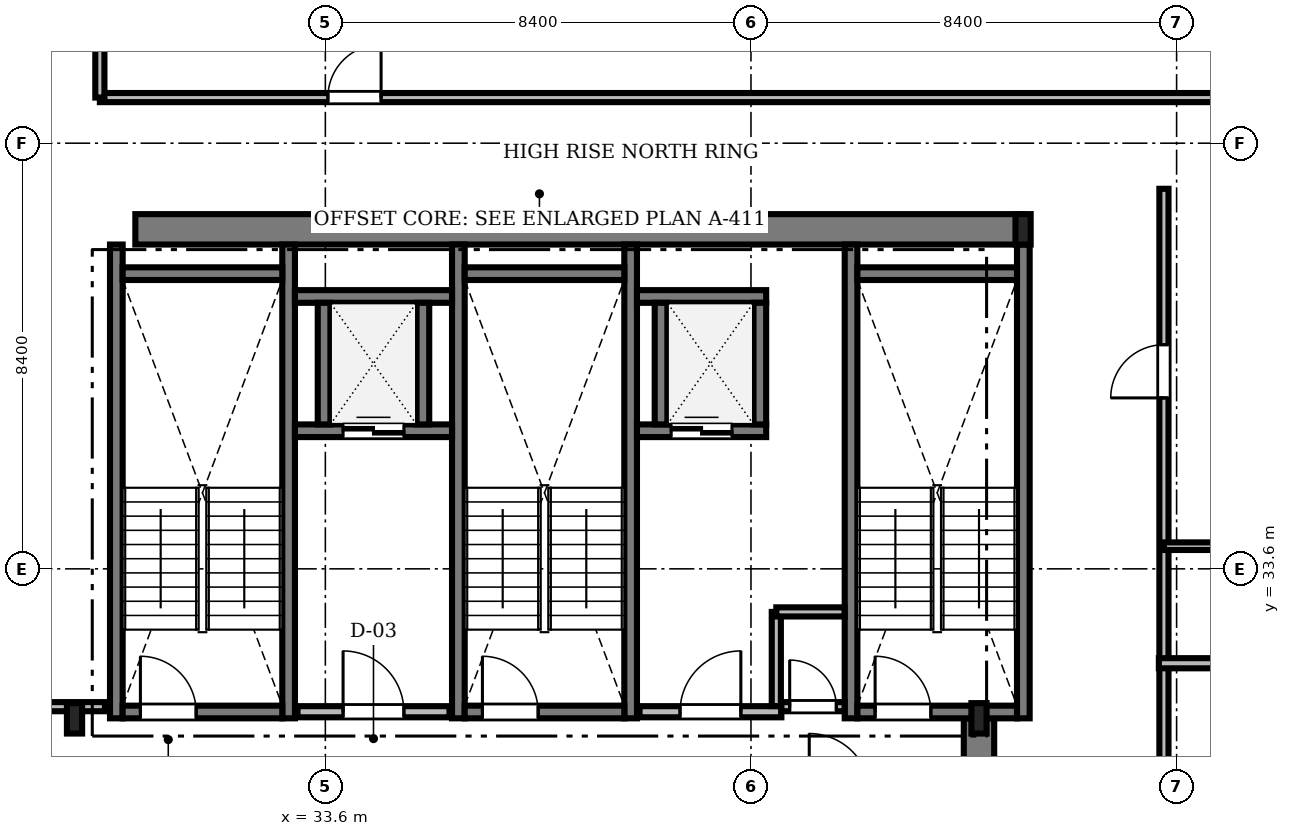
"""IFC4 building model, lengths in metres.
Left out: names, types, materials, properties, quantities, classifications, styles, units other than length and angle.
Written with IfcOpenShell. Run it as: python <this file> out.ifc"""

import sys

from ifc_helpers import new_model, si_unit, direction, frame, frame_2d, origin, origin_2d, place, context, subcontext, project, spatial, rectangle, i_section, extrude, source, transform, mapped, element, fill, save


model = new_model("IFC4")
c1 = context("Model", 3, precision=1e-05, world=origin(), true_north=direction((0.0, 1.0)))
c2 = subcontext(c1, "Body", "Model", "MODEL_VIEW")
j1 = project(units=[si_unit("LENGTHUNIT", "METRE"), si_unit("PLANEANGLEUNIT", "RADIAN")], contexts=[c1])
p1 = place(None, origin())
s1 = spatial("IfcSite", under=j1, at=p1, CompositionType="ELEMENT")
p2 = place(p1, origin())
s2 = spatial("IfcBuilding", under=s1, at=p2, CompositionType="ELEMENT")
p3 = place(p2, frame((0.0, 0.0, 242.7)))
s3 = spatial("IfcBuildingStorey", under=s2, at=p3, CompositionType="ELEMENT", Elevation=242.7)
m1 = source(origin(), c2, "Body", "SweptSolid", [
    extrude(rectangle(XDim=17.52, YDim=0.6, at=frame_2d((8.76, 0.0))), origin(), (0.0, 0.0, 1.0), 3.73),
])
p4 = place(p3, frame((29.85, 40.3, 0.0), z_axis=(0.0, 0.0, 1.0), x_axis=(1.0, 0.0, 0.0)))
e1 = element("IfcWall", 1, at=p4, inside=s3, PredefinedType="SHEAR", context=c2, shape_type="MappedRepresentation", body=[
    mapped(m1, transform((0.0, 0.0, 0.0), scale=1.0)),
])
m2 = source(origin(), c2, "Body", "SweptSolid", [
    extrude(rectangle(XDim=13.15, YDim=0.6, at=frame_2d((6.575, 0.0))), origin(), (0.0, 0.0, 1.0), 3.73),
])
p5 = place(p3, frame((46.5, 17.5, 0.0), z_axis=(0.0, 0.0, 1.0), x_axis=(0.0, 1.0, 0.0)))
e2 = element("IfcWall", 2, at=p5, inside=s3, PredefinedType="SHEAR", context=c2, shape_type="MappedRepresentation", body=[
    mapped(m2, transform((0.0, 0.0, 0.0), scale=1.0)),
])
m3 = source(origin(), c2, "Body", "SweptSolid", [
    extrude(i_section(OverallWidth=0.3, OverallDepth=0.6, WebThickness=0.015, FlangeThickness=0.03, FilletRadius=0.027, at=origin_2d()), origin(), (0.0, 0.0, 1.0), 3.73),
])
for number, where, z_axis, x_axis in (
    (3, (28.65, 30.65, 0.0), (0.0, 0.0, 1.0), (1.0, 0.0, 0.0)),
    (4, (46.5, 30.65, 0.0), (0.0, 0.0, 1.0), (1.0, 0.0, 0.0)),
    (5, (47.37, 40.3, 0.0), (0.0, 0.0, 1.0), (1.0, 0.0, 0.0)),
):
    element("IfcColumn", number, at=place(p3, frame(where, z_axis=z_axis, x_axis=x_axis)), inside=s3, PredefinedType="COLUMN", context=c2, shape_type="MappedRepresentation", body=[
        mapped(m3, transform((0.0, 0.0, 0.0), scale=1.0)),
    ])
m4 = source(origin(), c2, "Body", "SweptSolid", [
    extrude(rectangle(XDim=9.35, YDim=0.25, at=frame_2d((4.675, 0.0))), origin(), (0.0, 0.0, 1.0), 3.75),
])
for number, where, z_axis, x_axis in (
    (6, (29.475, 30.65, 0.0), (0.0, 0.0, 1.0), (0.0, 1.0, 0.0)),
    (7, (32.875, 30.65, 0.0), (0.0, 0.0, 1.0), (0.0, 1.0, 0.0)),
):
    element("IfcWall", number, at=place(p3, frame(where, z_axis=z_axis, x_axis=x_axis)), inside=s3, PredefinedType="SOLIDWALL", context=c2, shape_type="MappedRepresentation", body=[
        mapped(m4, transform((0.0, 0.0, 0.0), scale=1.0)),
    ])
m5 = source(origin(), c2, "Body", "SweptSolid", [
    extrude(rectangle(XDim=3.15, YDim=0.25, at=frame_2d((1.575, 0.0))), origin(), (0.0, 0.0, 1.0), 3.75),
])
p6 = place(p3, frame((29.6, 39.425, 0.0), z_axis=(0.0, 0.0, 1.0), x_axis=(1.0, 0.0, 0.0)))
e8 = element("IfcWall", 8, at=p6, inside=s3, PredefinedType="SOLIDWALL", context=c2, shape_type="MappedRepresentation", body=[
    mapped(m5, transform((0.0, 0.0, 0.0), scale=1.0)),
])
p7 = place(p3, frame((29.6, 30.775, 0.0), z_axis=(0.0, 0.0, 1.0), x_axis=(1.0, 0.0, 0.0)))
e9 = element("IfcWall", 9, at=p7, inside=s3, PredefinedType="SOLIDWALL", context=c2, shape_type="MappedRepresentation", body=[
    mapped(m5, transform((0.0, 0.0, 0.0), scale=1.0)),
])
m6 = source(origin(), c2, "Body", "SweptSolid", [
    extrude(rectangle(XDim=1.1, YDim=2.2, at=frame_2d((0.55, 1.1))), frame((0.0, 0.135, 0.0), z_axis=(0.0, -1.0, 0.0), x_axis=(1.0, 0.0, 0.0)), (0.0, 0.0, 1.0), 0.27),
])
p8 = place(p7, frame((0.35, 0.0, 0.0)))
e10 = element("IfcOpeningElement", 10, at=p8, cuts=e9, PredefinedType="OPENING", context=c2, shape_type="MappedRepresentation", body=[
    mapped(m6, transform((0.0, 0.0, 0.0), scale=1.0)),
])
for number, where, z_axis, x_axis in (
    (11, (36.225, 30.65, 0.0), (0.0, 0.0, 1.0), (0.0, 1.0, 0.0)),
    (12, (39.625, 30.65, 0.0), (0.0, 0.0, 1.0), (0.0, 1.0, 0.0)),
):
    element("IfcWall", number, at=place(p3, frame(where, z_axis=z_axis, x_axis=x_axis)), inside=s3, PredefinedType="SOLIDWALL", context=c2, shape_type="MappedRepresentation", body=[
        mapped(m4, transform((0.0, 0.0, 0.0), scale=1.0)),
    ])
p9 = place(p3, frame((36.35, 39.425, 0.0), z_axis=(0.0, 0.0, 1.0), x_axis=(1.0, 0.0, 0.0)))
e13 = element("IfcWall", 13, at=p9, inside=s3, PredefinedType="SOLIDWALL", context=c2, shape_type="MappedRepresentation", body=[
    mapped(m5, transform((0.0, 0.0, 0.0), scale=1.0)),
])
p10 = place(p3, frame((36.35, 30.775, 0.0), z_axis=(0.0, 0.0, 1.0), x_axis=(1.0, 0.0, 0.0)))
e14 = element("IfcWall", 14, at=p10, inside=s3, PredefinedType="SOLIDWALL", context=c2, shape_type="MappedRepresentation", body=[
    mapped(m5, transform((0.0, 0.0, 0.0), scale=1.0)),
])
p11 = place(p10, frame((0.35, 0.0, 0.0)))
e15 = element("IfcOpeningElement", 15, at=p11, cuts=e14, PredefinedType="OPENING", context=c2, shape_type="MappedRepresentation", body=[
    mapped(m6, transform((0.0, 0.0, 0.0), scale=1.0)),
])
for number, where, z_axis, x_axis in (
    (16, (43.975, 30.65, 0.0), (0.0, 0.0, 1.0), (0.0, 1.0, 0.0)),
    (17, (47.375, 30.65, 0.0), (0.0, 0.0, 1.0), (0.0, 1.0, 0.0)),
):
    element("IfcWall", number, at=place(p3, frame(where, z_axis=z_axis, x_axis=x_axis)), inside=s3, PredefinedType="SOLIDWALL", context=c2, shape_type="MappedRepresentation", body=[
        mapped(m4, transform((0.0, 0.0, 0.0), scale=1.0)),
    ])
p12 = place(p3, frame((44.1, 39.425, 0.0), z_axis=(0.0, 0.0, 1.0), x_axis=(1.0, 0.0, 0.0)))
e18 = element("IfcWall", 18, at=p12, inside=s3, PredefinedType="SOLIDWALL", context=c2, shape_type="MappedRepresentation", body=[
    mapped(m5, transform((0.0, 0.0, 0.0), scale=1.0)),
])
p13 = place(p3, frame((44.1, 30.775, 0.0), z_axis=(0.0, 0.0, 1.0), x_axis=(1.0, 0.0, 0.0)))
e19 = element("IfcWall", 19, at=p13, inside=s3, PredefinedType="SOLIDWALL", context=c2, shape_type="MappedRepresentation", body=[
    mapped(m5, transform((0.0, 0.0, 0.0), scale=1.0)),
])
p14 = place(p13, frame((0.35, 0.0, 0.0)))
e20 = element("IfcOpeningElement", 20, at=p14, cuts=e19, PredefinedType="OPENING", context=c2, shape_type="MappedRepresentation", body=[
    mapped(m6, transform((0.0, 0.0, 0.0), scale=1.0)),
])
m7 = source(origin(), c2, "Body", "SweptSolid", [
    extrude(rectangle(XDim=3.0, YDim=0.22, at=frame_2d((1.5, 0.0))), origin(), (0.0, 0.0, 1.0), 3.73),
])
p15 = place(p3, frame((33.05, 30.78, 0.0), z_axis=(0.0, 0.0, 1.0), x_axis=(1.0, 0.0, 0.0)))
e21 = element("IfcWall", 21, at=p15, inside=s3, PredefinedType="SOLIDWALL", context=c2, shape_type="MappedRepresentation", body=[
    mapped(m7, transform((0.0, 0.0, 0.0), scale=1.0)),
])
m8 = source(origin(), c2, "Body", "SweptSolid", [
    extrude(rectangle(XDim=1.2, YDim=2.2, at=frame_2d((0.6, 1.1))), frame((0.0, 0.12, 0.0), z_axis=(0.0, -1.0, 0.0), x_axis=(1.0, 0.0, 0.0)), (0.0, 0.0, 1.0), 0.24),
])
p16 = place(p15, frame((0.9, 0.0, 0.0)))
e22 = element("IfcOpeningElement", 22, at=p16, cuts=e21, PredefinedType="OPENING", context=c2, shape_type="MappedRepresentation", body=[
    mapped(m8, transform((0.0, 0.0, 0.0), scale=1.0)),
])
m9 = source(origin(), c2, "Body", "SweptSolid", [
    extrude(rectangle(XDim=2.8, YDim=0.22, at=frame_2d((1.4, 0.0))), origin(), (0.0, 0.0, 1.0), 3.73),
])
p17 = place(p3, frame((39.8, 30.78, 0.0), z_axis=(0.0, 0.0, 1.0), x_axis=(1.0, 0.0, 0.0)))
e23 = element("IfcWall", 23, at=p17, inside=s3, PredefinedType="SOLIDWALL", context=c2, shape_type="MappedRepresentation", body=[
    mapped(m9, transform((0.0, 0.0, 0.0), scale=1.0)),
])
p18 = place(p17, frame((0.8, 0.0, 0.0)))
e24 = element("IfcOpeningElement", 24, at=p18, cuts=e23, PredefinedType="OPENING", context=c2, shape_type="MappedRepresentation", body=[
    mapped(m8, transform((0.0, 0.0, 0.0), scale=1.0)),
])
m10 = source(origin(), c2, "Body", "SweptSolid", [
    extrude(rectangle(XDim=3.1, YDim=0.25, at=frame_2d((1.55, 0.0))), origin(), (0.0, 0.0, 1.0), 3.73),
])
p19 = place(p3, frame((33.0, 36.325, 0.0), z_axis=(0.0, 0.0, 1.0), x_axis=(1.0, 0.0, 0.0)))
e25 = element("IfcWall", 25, at=p19, inside=s3, PredefinedType="SOLIDWALL", context=c2, shape_type="MappedRepresentation", body=[
    mapped(m10, transform((0.0, 0.0, 0.0), scale=1.0)),
])
m11 = source(origin(), c2, "Body", "SweptSolid", [
    extrude(rectangle(XDim=1.2, YDim=2.25, at=frame_2d((0.6, 1.125))), frame((0.0, 0.135, 0.0), z_axis=(0.0, -1.0, 0.0), x_axis=(1.0, 0.0, 0.0)), (0.0, 0.0, 1.0), 0.27),
])
p20 = place(p19, frame((0.95, 0.0, 0.0)))
e26 = element("IfcOpeningElement", 26, at=p20, cuts=e25, PredefinedType="OPENING", context=c2, shape_type="MappedRepresentation", body=[
    mapped(m11, transform((0.0, 0.0, 0.0), scale=1.0)),
])
p21 = place(p3, frame((33.0, 38.975, 0.0), z_axis=(0.0, 0.0, 1.0), x_axis=(1.0, 0.0, 0.0)))
e27 = element("IfcWall", 27, at=p21, inside=s3, PredefinedType="SOLIDWALL", context=c2, shape_type="MappedRepresentation", body=[
    mapped(m10, transform((0.0, 0.0, 0.0), scale=1.0)),
])
m12 = source(origin(), c2, "Body", "SweptSolid", [
    extrude(rectangle(XDim=2.4, YDim=0.25, at=frame_2d((1.2, 0.0))), origin(), (0.0, 0.0, 1.0), 3.73),
])
for number, where, z_axis, x_axis in (
    (28, (33.575, 36.45, 0.0), (0.0, 0.0, 1.0), (0.0, 1.0, 0.0)),
    (29, (35.525, 36.45, 0.0), (0.0, 0.0, 1.0), (0.0, 1.0, 0.0)),
):
    element("IfcWall", number, at=place(p3, frame(where, z_axis=z_axis, x_axis=x_axis)), inside=s3, PredefinedType="SOLIDWALL", context=c2, shape_type="MappedRepresentation", body=[
        mapped(m12, transform((0.0, 0.0, 0.0), scale=1.0)),
    ])
m13 = source(origin(), c2, "Body", "SweptSolid", [
    extrude(rectangle(XDim=2.55, YDim=0.25, at=frame_2d((1.275, 0.0))), origin(), (0.0, 0.0, 1.0), 3.73),
])
p22 = place(p3, frame((39.75, 36.325, 0.0), z_axis=(0.0, 0.0, 1.0), x_axis=(1.0, 0.0, 0.0)))
e30 = element("IfcWall", 30, at=p22, inside=s3, PredefinedType="SOLIDWALL", context=c2, shape_type="MappedRepresentation", body=[
    mapped(m13, transform((0.0, 0.0, 0.0), scale=1.0)),
])
p23 = place(p22, frame((0.675, 0.0, 0.0)))
e31 = element("IfcOpeningElement", 31, at=p23, cuts=e30, PredefinedType="OPENING", context=c2, shape_type="MappedRepresentation", body=[
    mapped(m11, transform((0.0, 0.0, 0.0), scale=1.0)),
])
p24 = place(p3, frame((39.75, 38.975, 0.0), z_axis=(0.0, 0.0, 1.0), x_axis=(1.0, 0.0, 0.0)))
e32 = element("IfcWall", 32, at=p24, inside=s3, PredefinedType="SOLIDWALL", context=c2, shape_type="MappedRepresentation", body=[
    mapped(m13, transform((0.0, 0.0, 0.0), scale=1.0)),
])
for number, where, z_axis, x_axis in (
    (33, (40.225, 36.45, 0.0), (0.0, 0.0, 1.0), (0.0, 1.0, 0.0)),
    (34, (42.175, 36.45, 0.0), (0.0, 0.0, 1.0), (0.0, 1.0, 0.0)),
):
    element("IfcWall", number, at=place(p3, frame(where, z_axis=z_axis, x_axis=x_axis)), inside=s3, PredefinedType="SOLIDWALL", context=c2, shape_type="MappedRepresentation", body=[
        mapped(m12, transform((0.0, 0.0, 0.0), scale=1.0)),
    ])
m14 = source(origin(), c2, "Body", "SweptSolid", [
    extrude(rectangle(XDim=32.928, YDim=0.18, at=frame_2d((16.464, 0.0))), origin(), (0.0, 0.0, 1.0), 2.972),
])
p25 = place(p3, frame((29.15, 42.9, 0.0), z_axis=(0.0, 0.0, 1.0), x_axis=(1.0, 0.0, 0.0)))
e35 = element("IfcWall", 35, at=p25, inside=s3, PredefinedType="PARTITIONING", context=c2, shape_type="MappedRepresentation", body=[
    mapped(m14, transform((0.0, 0.0, 0.0), scale=1.0)),
])
m15 = source(origin(), c2, "Body", "SweptSolid", [
    extrude(rectangle(XDim=1.05, YDim=2.2, at=frame_2d((0.525, 1.1))), frame((0.0, 0.1, 0.0), z_axis=(0.0, -1.0, 0.0), x_axis=(1.0, 0.0, 0.0)), (0.0, 0.0, 1.0), 0.2),
])
p26 = place(p25, frame((4.5, 0.0, 0.0)))
e36 = element("IfcOpeningElement", 36, at=p26, cuts=e35, PredefinedType="OPENING", context=c2, shape_type="MappedRepresentation", body=[
    mapped(m15, transform((0.0, 0.0, 0.0), scale=1.0)),
])
m16 = source(origin(), c2, "Body", "SweptSolid", [
    extrude(rectangle(XDim=27.65, YDim=0.18, at=frame_2d((13.825, 0.0))), origin(), (0.0, 0.0, 1.0), 3.172),
])
p27 = place(p3, frame((50.15, 13.45, 0.0), z_axis=(0.0, 0.0, 1.0), x_axis=(0.0, 1.0, 0.0)))
e37 = element("IfcWall", 37, at=p27, inside=s3, PredefinedType="PARTITIONING", context=c2, shape_type="MappedRepresentation", body=[
    mapped(m16, transform((0.0, 0.0, 0.0), scale=1.0)),
])
p28 = place(p27, frame((5.237, 0.0, 0.0)))
e38 = element("IfcOpeningElement", 38, at=p28, cuts=e37, PredefinedType="OPENING", context=c2, shape_type="MappedRepresentation", body=[
    mapped(m15, transform((0.0, 0.0, 0.0), scale=1.0)),
])
p29 = place(p27, frame((14.38, 0.0, 0.0)))
e39 = element("IfcOpeningElement", 39, at=p29, cuts=e37, PredefinedType="OPENING", context=c2, shape_type="MappedRepresentation", body=[
    mapped(m15, transform((0.0, 0.0, 0.0), scale=1.0)),
])
p30 = place(p27, frame((23.523, 0.0, 0.0)))
e40 = element("IfcOpeningElement", 40, at=p30, cuts=e37, PredefinedType="OPENING", context=c2, shape_type="MappedRepresentation", body=[
    mapped(m15, transform((0.0, 0.0, 0.0), scale=1.0)),
])
m17 = source(origin(), c2, "Body", "SweptSolid", [
    extrude(rectangle(XDim=13.328, YDim=0.18, at=frame_2d((6.664, 0.0))), origin(), (0.0, 0.0, 1.0), 2.972),
])
p31 = place(p3, frame((15.922, 30.88, 0.0), z_axis=(0.0, 0.0, 1.0), x_axis=(1.0, 0.0, 0.0)))
e41 = element("IfcWall", 41, at=p31, inside=s3, PredefinedType="PARTITIONING", context=c2, shape_type="MappedRepresentation", body=[
    mapped(m17, transform((0.0, 0.0, 0.0), scale=1.0)),
])
p32 = place(p31, frame((6.278, 0.0, 0.0)))
e42 = element("IfcOpeningElement", 42, at=p32, cuts=e41, PredefinedType="OPENING", context=c2, shape_type="MappedRepresentation", body=[
    mapped(m15, transform((0.0, 0.0, 0.0), scale=1.0)),
])
m18 = source(origin(), c2, "Body", "SweptSolid", [
    extrude(rectangle(XDim=1.248, YDim=0.18, at=frame_2d((0.624, 0.0))), origin(), (0.0, 0.0, 1.0), 3.73),
])
p33 = place(p3, frame((42.6, 30.88, 0.0), z_axis=(0.0, 0.0, 1.0), x_axis=(1.0, 0.0, 0.0)))
e43 = element("IfcWall", 43, at=p33, inside=s3, PredefinedType="PARTITIONING", context=c2, shape_type="MappedRepresentation", body=[
    mapped(m18, transform((0.0, 0.0, 0.0), scale=1.0)),
])
m19 = source(origin(), c2, "Body", "SweptSolid", [
    extrude(rectangle(XDim=0.92, YDim=2.1, at=frame_2d((0.46, 1.05))), frame((0.0, 0.1, 0.0), z_axis=(0.0, -1.0, 0.0), x_axis=(1.0, 0.0, 0.0)), (0.0, 0.0, 1.0), 0.2),
])
p34 = place(p33, frame((0.164, 0.0, 0.0)))
e44 = element("IfcOpeningElement", 44, at=p34, cuts=e43, PredefinedType="OPENING", context=c2, shape_type="MappedRepresentation", body=[
    mapped(m19, transform((0.0, 0.0, 0.0), scale=1.0)),
])
m20 = source(origin(), c2, "Body", "SweptSolid", [
    extrude(rectangle(XDim=12.028, YDim=0.2, at=frame_2d((6.014, 0.0))), origin(), (0.0, 0.0, 1.0), 2.972),
])
p35 = place(p3, frame((50.05, 31.737, 0.0), z_axis=(0.0, 0.0, 1.0), x_axis=(1.0, 0.0, 0.0)))
e45 = element("IfcWall", 45, at=p35, inside=s3, PredefinedType="PARTITIONING", context=c2, shape_type="MappedRepresentation", body=[
    mapped(m20, transform((0.0, 0.0, 0.0), scale=1.0)),
])
m21 = source(origin(), c2, "Body", "SweptSolid", [
    extrude(rectangle(XDim=5.24, YDim=0.18, at=frame_2d((2.62, 0.0))), origin(), (0.0, 0.0, 1.0), 2.972),
])
p36 = place(p3, frame((29.15, 42.9, 0.0), z_axis=(0.0, 0.0, 1.0), x_axis=(0.0, 1.0, 0.0)))
e46 = element("IfcWall", 46, at=p36, inside=s3, PredefinedType="PARTITIONING", context=c2, shape_type="MappedRepresentation", body=[
    mapped(m21, transform((0.0, 0.0, 0.0), scale=1.0)),
])
m22 = source(origin(), c2, "Body", "SweptSolid", [
    extrude(rectangle(XDim=2.36, YDim=0.15, at=frame_2d((1.18, 0.0))), origin(), (0.0, 0.0, 1.0), 3.73),
])
p37 = place(p3, frame((50.15, 34.047, 0.0), z_axis=(0.0, 0.0, 1.0), x_axis=(1.0, 0.0, 0.0)))
e47 = element("IfcWall", 47, at=p37, inside=s3, PredefinedType="PARTITIONING", context=c2, shape_type="MappedRepresentation", body=[
    mapped(m22, transform((0.0, 0.0, 0.0), scale=1.0)),
])
m23 = source(origin(), c2, "Body", "SweptSolid", [
    extrude(rectangle(XDim=1.858, YDim=0.18, at=frame_2d((0.929, 0.0))), origin(), (0.0, 0.0, 1.0), 3.73),
])
p38 = place(p3, frame((42.5, 30.892, 0.0), z_axis=(0.0, 0.0, 1.0), x_axis=(0.0, 1.0, 0.0)))
e48 = element("IfcWall", 48, at=p38, inside=s3, PredefinedType="PARTITIONING", context=c2, shape_type="MappedRepresentation", body=[
    mapped(m23, transform((0.0, 0.0, 0.0), scale=1.0)),
])
m24 = source(origin(), c2, "Body", "SweptSolid", [
    extrude(rectangle(XDim=1.348, YDim=0.18, at=frame_2d((0.674, 0.0))), origin(), (0.0, 0.0, 1.0), 3.73),
])
p39 = place(p3, frame((42.5, 32.75, 0.0), z_axis=(0.0, 0.0, 1.0), x_axis=(1.0, 0.0, 0.0)))
e49 = element("IfcWall", 49, at=p39, inside=s3, PredefinedType="PARTITIONING", context=c2, shape_type="MappedRepresentation", body=[
    mapped(m24, transform((0.0, 0.0, 0.0), scale=1.0)),
])
m25 = source(origin(), c2, "Body", "SweptSolid", [
    extrude(rectangle(XDim=1.1, YDim=2.2, at=frame_2d((0.55, 1.1))), frame((0.0, 0.025, 0.0), z_axis=(0.0, -1.0, 0.0), x_axis=(1.0, 0.0, 0.0)), (0.0, 0.0, 1.0), 0.05),
])
p40 = place(p8, origin())
e50 = element("IfcDoor", 50, at=p40, inside=s3, OperationType="SINGLE_SWING_LEFT", PredefinedType="DOOR", context=c2, shape_type="MappedRepresentation", body=[
    mapped(m25, transform((0.0, 0.0, 0.0), scale=1.0)),
])
fill(e10, e50)
p41 = place(p11, origin())
e51 = element("IfcDoor", 51, at=p41, inside=s3, OperationType="SINGLE_SWING_LEFT", PredefinedType="DOOR", context=c2, shape_type="MappedRepresentation", body=[
    mapped(m25, transform((0.0, 0.0, 0.0), scale=1.0)),
])
fill(e15, e51)
p42 = place(p14, origin())
e52 = element("IfcDoor", 52, at=p42, inside=s3, OperationType="SINGLE_SWING_LEFT", PredefinedType="DOOR", context=c2, shape_type="MappedRepresentation", body=[
    mapped(m25, transform((0.0, 0.0, 0.0), scale=1.0)),
])
fill(e20, e52)
m26 = source(origin(), c2, "Body", "SweptSolid", [
    extrude(rectangle(XDim=1.2, YDim=2.2, at=frame_2d((0.6, 1.1))), frame((0.0, 0.025, 0.0), z_axis=(0.0, -1.0, 0.0), x_axis=(1.0, 0.0, 0.0)), (0.0, 0.0, 1.0), 0.05),
])
p43 = place(p16, origin())
e53 = element("IfcDoor", 53, at=p43, inside=s3, OperationType="SINGLE_SWING_LEFT", PredefinedType="DOOR", context=c2, shape_type="MappedRepresentation", body=[
    mapped(m26, transform((0.0, 0.0, 0.0), scale=1.0)),
])
fill(e22, e53)
p44 = place(p18, origin())
e54 = element("IfcDoor", 54, at=p44, inside=s3, OperationType="SINGLE_SWING_RIGHT", PredefinedType="DOOR", context=c2, shape_type="MappedRepresentation", body=[
    mapped(m26, transform((0.0, 0.0, 0.0), scale=1.0)),
])
fill(e24, e54)
m27 = source(origin(), c2, "Body", "SweptSolid", [
    extrude(rectangle(XDim=1.2, YDim=2.25, at=frame_2d((0.6, 1.125))), frame((0.0, 0.025, 0.0), z_axis=(0.0, -1.0, 0.0), x_axis=(1.0, 0.0, 0.0)), (0.0, 0.0, 1.0), 0.05),
])
p45 = place(p20, origin())
e55 = element("IfcDoor", 55, at=p45, inside=s3, OperationType="DOUBLE_DOOR_SLIDING", PredefinedType="DOOR", context=c2, shape_type="MappedRepresentation", body=[
    mapped(m27, transform((0.0, 0.0, 0.0), scale=1.0)),
])
fill(e26, e55)
p46 = place(p23, origin())
e56 = element("IfcDoor", 56, at=p46, inside=s3, OperationType="DOUBLE_DOOR_SLIDING", PredefinedType="DOOR", context=c2, shape_type="MappedRepresentation", body=[
    mapped(m27, transform((0.0, 0.0, 0.0), scale=1.0)),
])
fill(e31, e56)
m28 = source(origin(), c2, "Body", "SweptSolid", [
    extrude(rectangle(XDim=1.05, YDim=2.2, at=frame_2d((0.525, 1.1))), frame((0.0, 0.025, 0.0), z_axis=(0.0, -1.0, 0.0), x_axis=(1.0, 0.0, 0.0)), (0.0, 0.0, 1.0), 0.05),
])
p47 = place(p26, origin())
e57 = element("IfcDoor", 57, at=p47, inside=s3, OperationType="SINGLE_SWING_RIGHT", PredefinedType="DOOR", context=c2, shape_type="MappedRepresentation", body=[
    mapped(m28, transform((0.0, 0.0, 0.0), scale=1.0)),
])
fill(e36, e57)
p48 = place(p30, origin())
e58 = element("IfcDoor", 58, at=p48, inside=s3, OperationType="SINGLE_SWING_LEFT", PredefinedType="DOOR", context=c2, shape_type="MappedRepresentation", body=[
    mapped(m28, transform((0.0, 0.0, 0.0), scale=1.0)),
])
fill(e40, e58)
m29 = source(origin(), c2, "Body", "SweptSolid", [
    extrude(rectangle(XDim=0.92, YDim=2.1, at=frame_2d((0.46, 1.05))), frame((0.0, 0.025, 0.0), z_axis=(0.0, -1.0, 0.0), x_axis=(1.0, 0.0, 0.0)), (0.0, 0.0, 1.0), 0.05),
])
p49 = place(p34, origin())
e59 = element("IfcDoor", 59, at=p49, inside=s3, OperationType="SINGLE_SWING_LEFT", PredefinedType="DOOR", context=c2, shape_type="MappedRepresentation", body=[
    mapped(m29, transform((0.0, 0.0, 0.0), scale=1.0)),
])
fill(e44, e59)
save(model, sys.argv[1])
